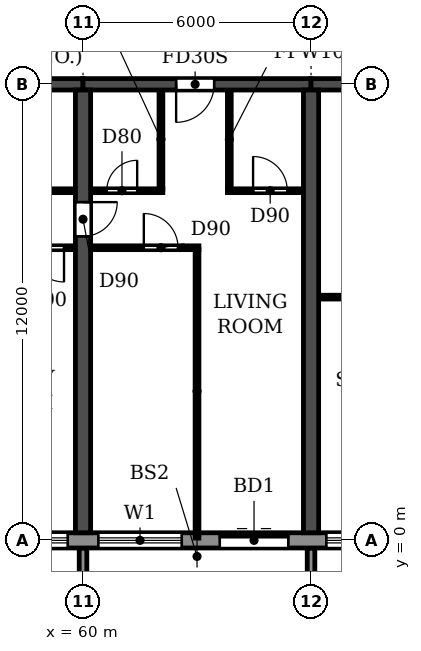
"""IFC4 building model, lengths in metres.
Left out: names, types, materials, properties, quantities, classifications, styles, units other than length and angle.
Written with IfcOpenShell. Run it as: python <this file> out.ifc"""

import sys

from ifc_helpers import new_model, si_unit, direction, frame, frame_2d, origin, place, context, subcontext, project, spatial, polyline, rectangle, outline, extrude, source, transform, mapped, element, fill, save


model = new_model("IFC4")
c1 = context("Model", 3, precision=1e-05, world=origin(), true_north=direction((0.0, 1.0)))
c2 = subcontext(c1, "Body", "Model", "MODEL_VIEW")
j1 = project(units=[si_unit("LENGTHUNIT", "METRE"), si_unit("PLANEANGLEUNIT", "RADIAN")], contexts=[c1])
p1 = place(None, origin())
s1 = spatial("IfcSite", under=j1, at=p1, CompositionType="ELEMENT")
p2 = place(p1, origin())
s2 = spatial("IfcBuilding", under=s1, at=p2, CompositionType="ELEMENT")
p3 = place(p2, frame((0.0, 0.0, 49.8)))
s3 = spatial("IfcBuildingStorey", under=s2, at=p3, CompositionType="ELEMENT", Elevation=49.8)
p4 = place(p3, frame((60.0, 0.2, 0.0), z_axis=(0.0, 0.0, 1.0), x_axis=(0.0, 1.0, 0.0)))
e1 = element("IfcWall", 1, at=p4, inside=s3, PredefinedType="SHEAR", context=c2, shape_type="SweptSolid", body=[
    extrude(rectangle(XDim=11.65, YDim=0.4, at=frame_2d((5.825, 0.0))), origin(), (0.0, 0.0, 1.0), 3.0),
])
p5 = place(p4, frame((7.8, 0.0, 0.0)))
e2 = element("IfcOpeningElement", 2, at=p5, cuts=e1, PredefinedType="OPENING", context=c2, shape_type="SweptSolid", body=[
    extrude(rectangle(XDim=0.9, YDim=2.1, at=frame_2d((0.45, 1.05))), frame((0.0, 0.21, 0.0), z_axis=(0.0, -1.0, 0.0), x_axis=(1.0, 0.0, 0.0)), (0.0, 0.0, 1.0), 0.42),
])
p6 = place(p3, frame((66.0, 0.2, 0.0), z_axis=(0.0, 0.0, 1.0), x_axis=(0.0, 1.0, 0.0)))
e3 = element("IfcWall", 3, at=p6, inside=s3, PredefinedType="SHEAR", context=c2, shape_type="SweptSolid", body=[
    extrude(rectangle(XDim=11.65, YDim=0.4, at=frame_2d((5.825, 0.0))), origin(), (0.0, 0.0, 1.0), 3.0),
])
p7 = place(p3, frame((54.0, 12.0, 0.0), z_axis=(0.0, 0.0, 1.0), x_axis=(1.0, 0.0, 0.0)))
e4 = element("IfcWall", 4, at=p7, inside=s3, PredefinedType="SHEAR", context=c2, shape_type="SweptSolid", body=[
    extrude(rectangle(XDim=6.0, YDim=0.3, at=frame_2d((3.0, 0.0))), origin(), (0.0, 0.0, 1.0), 2.4),
])
p8 = place(p3, frame((60.0, 12.0, 0.0), z_axis=(0.0, 0.0, 1.0), x_axis=(1.0, 0.0, 0.0)))
e5 = element("IfcWall", 5, at=p8, inside=s3, PredefinedType="SHEAR", context=c2, shape_type="SweptSolid", body=[
    extrude(rectangle(XDim=6.0, YDim=0.3, at=frame_2d((3.0, 0.0))), origin(), (0.0, 0.0, 1.0), 2.4),
])
p9 = place(p8, frame((2.45, 0.0, 0.0)))
e6 = element("IfcOpeningElement", 6, at=p9, cuts=e5, PredefinedType="OPENING", context=c2, shape_type="SweptSolid", body=[
    extrude(rectangle(XDim=1.0, YDim=2.1, at=frame_2d((0.5, 1.05))), frame((0.0, 0.16, 0.0), z_axis=(0.0, -1.0, 0.0), x_axis=(1.0, 0.0, 0.0)), (0.0, 0.0, 1.0), 0.32),
])
p10 = place(p3, frame((66.0, 12.0, 0.0), z_axis=(0.0, 0.0, 1.0), x_axis=(1.0, 0.0, 0.0)))
e7 = element("IfcWall", 7, at=p10, inside=s3, PredefinedType="SHEAR", context=c2, shape_type="SweptSolid", body=[
    extrude(rectangle(XDim=6.0, YDim=0.3, at=frame_2d((3.0, 0.0))), origin(), (0.0, 0.0, 1.0), 2.4),
])
p11 = place(p10, frame((2.55, 0.0, 0.0)))
e8 = element("IfcOpeningElement", 8, at=p11, cuts=e7, PredefinedType="OPENING", context=c2, shape_type="SweptSolid", body=[
    extrude(rectangle(XDim=1.0, YDim=2.1, at=frame_2d((0.5, 1.05))), frame((0.0, 0.16, 0.0), z_axis=(0.0, -1.0, 0.0), x_axis=(1.0, 0.0, 0.0)), (0.0, 0.0, 1.0), 0.32),
])
p12 = place(p3, frame((4.683, 0.0, 0.0), z_axis=(0.0, 0.0, 1.0), x_axis=(1.0, 0.0, 0.0)))
e9 = element("IfcWall", 9, at=p12, inside=s3, PredefinedType="STANDARD", context=c2, shape_type="SweptSolid", body=[
    extrude(rectangle(XDim=92.634, YDim=0.4, at=frame_2d((46.317, 0.0))), origin(), (0.0, 0.0, 1.0), 3.0),
])
p13 = place(p12, frame((1.717, 0.0, 0.9)))
e10 = element("IfcOpeningElement", 10, at=p13, cuts=e9, PredefinedType="OPENING", context=c2, shape_type="SweptSolid", body=[
    extrude(rectangle(XDim=2.2, YDim=1.5, at=frame_2d((1.1, 0.75))), frame((0.0, 0.21, 0.0), z_axis=(0.0, -1.0, 0.0), x_axis=(1.0, 0.0, 0.0)), (0.0, 0.0, 1.0), 0.42),
])
p14 = place(p12, frame((4.717, 0.0, 0.9)))
e11 = element("IfcOpeningElement", 11, at=p14, cuts=e9, PredefinedType="OPENING", context=c2, shape_type="SweptSolid", body=[
    extrude(rectangle(XDim=2.2, YDim=1.5, at=frame_2d((1.1, 0.75))), frame((0.0, 0.21, 0.0), z_axis=(0.0, -1.0, 0.0), x_axis=(1.0, 0.0, 0.0)), (0.0, 0.0, 1.0), 0.42),
])
p15 = place(p12, frame((7.717, 0.0, 0.9)))
e12 = element("IfcOpeningElement", 12, at=p15, cuts=e9, PredefinedType="OPENING", context=c2, shape_type="SweptSolid", body=[
    extrude(rectangle(XDim=2.2, YDim=1.5, at=frame_2d((1.1, 0.75))), frame((0.0, 0.21, 0.0), z_axis=(0.0, -1.0, 0.0), x_axis=(1.0, 0.0, 0.0)), (0.0, 0.0, 1.0), 0.42),
])
p16 = place(p12, frame((10.917, 0.0, 0.0)))
e13 = element("IfcOpeningElement", 13, at=p16, cuts=e9, PredefinedType="OPENING", context=c2, shape_type="SweptSolid", body=[
    extrude(rectangle(XDim=1.8, YDim=2.4, at=frame_2d((0.9, 1.2))), frame((0.0, 0.21, 0.0), z_axis=(0.0, -1.0, 0.0), x_axis=(1.0, 0.0, 0.0)), (0.0, 0.0, 1.0), 0.42),
])
p17 = place(p12, frame((13.717, 0.0, 0.9)))
e14 = element("IfcOpeningElement", 14, at=p17, cuts=e9, PredefinedType="OPENING", context=c2, shape_type="SweptSolid", body=[
    extrude(rectangle(XDim=2.2, YDim=1.5, at=frame_2d((1.1, 0.75))), frame((0.0, 0.21, 0.0), z_axis=(0.0, -1.0, 0.0), x_axis=(1.0, 0.0, 0.0)), (0.0, 0.0, 1.0), 0.42),
])
p18 = place(p12, frame((16.717, 0.0, 0.9)))
e15 = element("IfcOpeningElement", 15, at=p18, cuts=e9, PredefinedType="OPENING", context=c2, shape_type="SweptSolid", body=[
    extrude(rectangle(XDim=2.2, YDim=1.5, at=frame_2d((1.1, 0.75))), frame((0.0, 0.21, 0.0), z_axis=(0.0, -1.0, 0.0), x_axis=(1.0, 0.0, 0.0)), (0.0, 0.0, 1.0), 0.42),
])
p19 = place(p12, frame((19.917, 0.0, 0.0)))
e16 = element("IfcOpeningElement", 16, at=p19, cuts=e9, PredefinedType="OPENING", context=c2, shape_type="SweptSolid", body=[
    extrude(rectangle(XDim=1.8, YDim=2.4, at=frame_2d((0.9, 1.2))), frame((0.0, 0.21, 0.0), z_axis=(0.0, -1.0, 0.0), x_axis=(1.0, 0.0, 0.0)), (0.0, 0.0, 1.0), 0.42),
])
p20 = place(p12, frame((22.717, 0.0, 0.9)))
e17 = element("IfcOpeningElement", 17, at=p20, cuts=e9, PredefinedType="OPENING", context=c2, shape_type="SweptSolid", body=[
    extrude(rectangle(XDim=2.2, YDim=1.5, at=frame_2d((1.1, 0.75))), frame((0.0, 0.21, 0.0), z_axis=(0.0, -1.0, 0.0), x_axis=(1.0, 0.0, 0.0)), (0.0, 0.0, 1.0), 0.42),
])
p21 = place(p12, frame((25.717, 0.0, 0.9)))
e18 = element("IfcOpeningElement", 18, at=p21, cuts=e9, PredefinedType="OPENING", context=c2, shape_type="SweptSolid", body=[
    extrude(rectangle(XDim=2.2, YDim=1.5, at=frame_2d((1.1, 0.75))), frame((0.0, 0.21, 0.0), z_axis=(0.0, -1.0, 0.0), x_axis=(1.0, 0.0, 0.0)), (0.0, 0.0, 1.0), 0.42),
])
p22 = place(p12, frame((28.717, 0.0, 0.9)))
e19 = element("IfcOpeningElement", 19, at=p22, cuts=e9, PredefinedType="OPENING", context=c2, shape_type="SweptSolid", body=[
    extrude(rectangle(XDim=2.2, YDim=1.5, at=frame_2d((1.1, 0.75))), frame((0.0, 0.21, 0.0), z_axis=(0.0, -1.0, 0.0), x_axis=(1.0, 0.0, 0.0)), (0.0, 0.0, 1.0), 0.42),
])
p23 = place(p12, frame((31.717, 0.0, 0.9)))
e20 = element("IfcOpeningElement", 20, at=p23, cuts=e9, PredefinedType="OPENING", context=c2, shape_type="SweptSolid", body=[
    extrude(rectangle(XDim=2.2, YDim=1.5, at=frame_2d((1.1, 0.75))), frame((0.0, 0.21, 0.0), z_axis=(0.0, -1.0, 0.0), x_axis=(1.0, 0.0, 0.0)), (0.0, 0.0, 1.0), 0.42),
])
p24 = place(p12, frame((34.917, 0.0, 0.0)))
e21 = element("IfcOpeningElement", 21, at=p24, cuts=e9, PredefinedType="OPENING", context=c2, shape_type="SweptSolid", body=[
    extrude(rectangle(XDim=1.8, YDim=2.4, at=frame_2d((0.9, 1.2))), frame((0.0, 0.21, 0.0), z_axis=(0.0, -1.0, 0.0), x_axis=(1.0, 0.0, 0.0)), (0.0, 0.0, 1.0), 0.42),
])
p25 = place(p12, frame((37.717, 0.0, 0.9)))
e22 = element("IfcOpeningElement", 22, at=p25, cuts=e9, PredefinedType="OPENING", context=c2, shape_type="SweptSolid", body=[
    extrude(rectangle(XDim=2.2, YDim=1.5, at=frame_2d((1.1, 0.75))), frame((0.0, 0.21, 0.0), z_axis=(0.0, -1.0, 0.0), x_axis=(1.0, 0.0, 0.0)), (0.0, 0.0, 1.0), 0.42),
])
p26 = place(p12, frame((40.717, 0.0, 0.9)))
e23 = element("IfcOpeningElement", 23, at=p26, cuts=e9, PredefinedType="OPENING", context=c2, shape_type="SweptSolid", body=[
    extrude(rectangle(XDim=2.2, YDim=1.5, at=frame_2d((1.1, 0.75))), frame((0.0, 0.21, 0.0), z_axis=(0.0, -1.0, 0.0), x_axis=(1.0, 0.0, 0.0)), (0.0, 0.0, 1.0), 0.42),
])
p27 = place(p12, frame((43.717, 0.0, 0.9)))
e24 = element("IfcOpeningElement", 24, at=p27, cuts=e9, PredefinedType="OPENING", context=c2, shape_type="SweptSolid", body=[
    extrude(rectangle(XDim=2.2, YDim=1.5, at=frame_2d((1.1, 0.75))), frame((0.0, 0.21, 0.0), z_axis=(0.0, -1.0, 0.0), x_axis=(1.0, 0.0, 0.0)), (0.0, 0.0, 1.0), 0.42),
])
p28 = place(p12, frame((46.917, 0.0, 0.0)))
e25 = element("IfcOpeningElement", 25, at=p28, cuts=e9, PredefinedType="OPENING", context=c2, shape_type="SweptSolid", body=[
    extrude(rectangle(XDim=1.8, YDim=2.4, at=frame_2d((0.9, 1.2))), frame((0.0, 0.21, 0.0), z_axis=(0.0, -1.0, 0.0), x_axis=(1.0, 0.0, 0.0)), (0.0, 0.0, 1.0), 0.42),
])
p29 = place(p12, frame((49.717, 0.0, 0.9)))
e26 = element("IfcOpeningElement", 26, at=p29, cuts=e9, PredefinedType="OPENING", context=c2, shape_type="SweptSolid", body=[
    extrude(rectangle(XDim=2.2, YDim=1.5, at=frame_2d((1.1, 0.75))), frame((0.0, 0.21, 0.0), z_axis=(0.0, -1.0, 0.0), x_axis=(1.0, 0.0, 0.0)), (0.0, 0.0, 1.0), 0.42),
])
p30 = place(p12, frame((52.717, 0.0, 0.9)))
e27 = element("IfcOpeningElement", 27, at=p30, cuts=e9, PredefinedType="OPENING", context=c2, shape_type="SweptSolid", body=[
    extrude(rectangle(XDim=2.2, YDim=1.5, at=frame_2d((1.1, 0.75))), frame((0.0, 0.21, 0.0), z_axis=(0.0, -1.0, 0.0), x_axis=(1.0, 0.0, 0.0)), (0.0, 0.0, 1.0), 0.42),
])
p31 = place(p12, frame((55.717, 0.0, 0.9)))
e28 = element("IfcOpeningElement", 28, at=p31, cuts=e9, PredefinedType="OPENING", context=c2, shape_type="SweptSolid", body=[
    extrude(rectangle(XDim=2.2, YDim=1.5, at=frame_2d((1.1, 0.75))), frame((0.0, 0.21, 0.0), z_axis=(0.0, -1.0, 0.0), x_axis=(1.0, 0.0, 0.0)), (0.0, 0.0, 1.0), 0.42),
])
p32 = place(p12, frame((58.917, 0.0, 0.0)))
e29 = element("IfcOpeningElement", 29, at=p32, cuts=e9, PredefinedType="OPENING", context=c2, shape_type="SweptSolid", body=[
    extrude(rectangle(XDim=1.8, YDim=2.4, at=frame_2d((0.9, 1.2))), frame((0.0, 0.21, 0.0), z_axis=(0.0, -1.0, 0.0), x_axis=(1.0, 0.0, 0.0)), (0.0, 0.0, 1.0), 0.42),
])
p33 = place(p12, frame((61.717, 0.0, 0.9)))
e30 = element("IfcOpeningElement", 30, at=p33, cuts=e9, PredefinedType="OPENING", context=c2, shape_type="SweptSolid", body=[
    extrude(rectangle(XDim=2.2, YDim=1.5, at=frame_2d((1.1, 0.75))), frame((0.0, 0.21, 0.0), z_axis=(0.0, -1.0, 0.0), x_axis=(1.0, 0.0, 0.0)), (0.0, 0.0, 1.0), 0.42),
])
p34 = place(p12, frame((64.717, 0.0, 0.9)))
e31 = element("IfcOpeningElement", 31, at=p34, cuts=e9, PredefinedType="OPENING", context=c2, shape_type="SweptSolid", body=[
    extrude(rectangle(XDim=2.2, YDim=1.5, at=frame_2d((1.1, 0.75))), frame((0.0, 0.21, 0.0), z_axis=(0.0, -1.0, 0.0), x_axis=(1.0, 0.0, 0.0)), (0.0, 0.0, 1.0), 0.42),
])
p35 = place(p12, frame((67.717, 0.0, 0.9)))
e32 = element("IfcOpeningElement", 32, at=p35, cuts=e9, PredefinedType="OPENING", context=c2, shape_type="SweptSolid", body=[
    extrude(rectangle(XDim=2.2, YDim=1.5, at=frame_2d((1.1, 0.75))), frame((0.0, 0.21, 0.0), z_axis=(0.0, -1.0, 0.0), x_axis=(1.0, 0.0, 0.0)), (0.0, 0.0, 1.0), 0.42),
])
p36 = place(p12, frame((70.917, 0.0, 0.0)))
e33 = element("IfcOpeningElement", 33, at=p36, cuts=e9, PredefinedType="OPENING", context=c2, shape_type="SweptSolid", body=[
    extrude(rectangle(XDim=1.8, YDim=2.4, at=frame_2d((0.9, 1.2))), frame((0.0, 0.21, 0.0), z_axis=(0.0, -1.0, 0.0), x_axis=(1.0, 0.0, 0.0)), (0.0, 0.0, 1.0), 0.42),
])
p37 = place(p12, frame((73.717, 0.0, 0.9)))
e34 = element("IfcOpeningElement", 34, at=p37, cuts=e9, PredefinedType="OPENING", context=c2, shape_type="SweptSolid", body=[
    extrude(rectangle(XDim=2.2, YDim=1.5, at=frame_2d((1.1, 0.75))), frame((0.0, 0.21, 0.0), z_axis=(0.0, -1.0, 0.0), x_axis=(1.0, 0.0, 0.0)), (0.0, 0.0, 1.0), 0.42),
])
p38 = place(p12, frame((76.717, 0.0, 0.9)))
e35 = element("IfcOpeningElement", 35, at=p38, cuts=e9, PredefinedType="OPENING", context=c2, shape_type="SweptSolid", body=[
    extrude(rectangle(XDim=2.2, YDim=1.5, at=frame_2d((1.1, 0.75))), frame((0.0, 0.21, 0.0), z_axis=(0.0, -1.0, 0.0), x_axis=(1.0, 0.0, 0.0)), (0.0, 0.0, 1.0), 0.42),
])
p39 = place(p12, frame((79.717, 0.0, 0.9)))
e36 = element("IfcOpeningElement", 36, at=p39, cuts=e9, PredefinedType="OPENING", context=c2, shape_type="SweptSolid", body=[
    extrude(rectangle(XDim=2.2, YDim=1.5, at=frame_2d((1.1, 0.75))), frame((0.0, 0.21, 0.0), z_axis=(0.0, -1.0, 0.0), x_axis=(1.0, 0.0, 0.0)), (0.0, 0.0, 1.0), 0.42),
])
p40 = place(p12, frame((82.917, 0.0, 0.0)))
e37 = element("IfcOpeningElement", 37, at=p40, cuts=e9, PredefinedType="OPENING", context=c2, shape_type="SweptSolid", body=[
    extrude(rectangle(XDim=1.8, YDim=2.4, at=frame_2d((0.9, 1.2))), frame((0.0, 0.21, 0.0), z_axis=(0.0, -1.0, 0.0), x_axis=(1.0, 0.0, 0.0)), (0.0, 0.0, 1.0), 0.42),
])
p41 = place(p12, frame((85.717, 0.0, 0.9)))
e38 = element("IfcOpeningElement", 38, at=p41, cuts=e9, PredefinedType="OPENING", context=c2, shape_type="SweptSolid", body=[
    extrude(rectangle(XDim=2.2, YDim=1.5, at=frame_2d((1.1, 0.75))), frame((0.0, 0.21, 0.0), z_axis=(0.0, -1.0, 0.0), x_axis=(1.0, 0.0, 0.0)), (0.0, 0.0, 1.0), 0.42),
])
p42 = place(p12, frame((88.717, 0.0, 0.9)))
e39 = element("IfcOpeningElement", 39, at=p42, cuts=e9, PredefinedType="OPENING", context=c2, shape_type="SweptSolid", body=[
    extrude(rectangle(XDim=2.2, YDim=1.5, at=frame_2d((1.1, 0.75))), frame((0.0, 0.21, 0.0), z_axis=(0.0, -1.0, 0.0), x_axis=(1.0, 0.0, 0.0)), (0.0, 0.0, 1.0), 0.42),
])
m1 = source(origin(), c2, "Body", "SweptSolid", [
    extrude(outline(polyline([(0.0, 0.0), (0.2, 0.0), (0.2, 1.65), (0.0, 1.65), (0.0, 0.0)])), origin(), (0.0, 0.0, 1.0), 3.1),
])
for number, where in (
    (40, (59.9, -1.85, 0.0)),
    (41, (65.9, -1.85, 0.0)),
):
    element("IfcWall", number, at=place(p3, frame(where)), inside=s3, PredefinedType="STANDARD", context=c2, shape_type="MappedRepresentation", body=[
        mapped(m1, transform((0.0, 0.0, 0.0))),
    ])
p43 = place(p3, frame((66.21, 6.4, 0.0), z_axis=(0.0, 0.0, 1.0), x_axis=(1.0, 0.0, 0.0)))
e42 = element("IfcWall", 42, at=p43, inside=s3, PredefinedType="PARTITIONING", context=c2, shape_type="SweptSolid", body=[
    extrude(rectangle(XDim=1.99, YDim=0.1, at=frame_2d((0.995, 0.0))), origin(), (0.0, 0.0, 1.0), 3.0),
])
p44 = place(p3, frame((57.1, 7.7, 0.0), z_axis=(0.0, 0.0, 1.0), x_axis=(1.0, 0.0, 0.0)))
e43 = element("IfcWall", 43, at=p44, inside=s3, PredefinedType="PARTITIONING", context=c2, shape_type="SweptSolid", body=[
    extrude(rectangle(XDim=2.69, YDim=0.1, at=frame_2d((1.345, 0.0))), origin(), (0.0, 0.0, 1.0), 3.0),
])
p45 = place(p44, frame((1.5, 0.0, 0.0)))
e44 = element("IfcOpeningElement", 44, at=p45, cuts=e43, PredefinedType="OPENING", context=c2, shape_type="SweptSolid", body=[
    extrude(rectangle(XDim=0.9, YDim=2.1, at=frame_2d((0.45, 1.05))), frame((0.0, 0.06, 0.0), z_axis=(0.0, -1.0, 0.0), x_axis=(1.0, 0.0, 0.0)), (0.0, 0.0, 1.0), 0.12),
])
p46 = place(p3, frame((60.21, 7.7, 0.0), z_axis=(0.0, 0.0, 1.0), x_axis=(1.0, 0.0, 0.0)))
e45 = element("IfcWall", 45, at=p46, inside=s3, PredefinedType="PARTITIONING", context=c2, shape_type="SweptSolid", body=[
    extrude(rectangle(XDim=2.84, YDim=0.1, at=frame_2d((1.42, 0.0))), origin(), (0.0, 0.0, 1.0), 3.0),
])
p47 = place(p46, frame((1.39, 0.0, 0.0)))
e46 = element("IfcOpeningElement", 46, at=p47, cuts=e45, PredefinedType="OPENING", context=c2, shape_type="SweptSolid", body=[
    extrude(rectangle(XDim=0.9, YDim=2.1, at=frame_2d((0.45, 1.05))), frame((0.0, 0.06, 0.0), z_axis=(0.0, -1.0, 0.0), x_axis=(1.0, 0.0, 0.0)), (0.0, 0.0, 1.0), 0.12),
])
p48 = place(p3, frame((57.1, 9.2, 0.0), z_axis=(0.0, 0.0, 1.0), x_axis=(1.0, 0.0, 0.0)))
e47 = element("IfcWall", 47, at=p48, inside=s3, PredefinedType="PARTITIONING", context=c2, shape_type="SweptSolid", body=[
    extrude(rectangle(XDim=2.69, YDim=0.1, at=frame_2d((1.345, 0.0))), origin(), (0.0, 0.0, 1.0), 3.0),
])
p49 = place(p48, frame((1.0, 0.0, 0.0)))
e48 = element("IfcOpeningElement", 48, at=p49, cuts=e47, PredefinedType="OPENING", context=c2, shape_type="SweptSolid", body=[
    extrude(rectangle(XDim=0.8, YDim=2.1, at=frame_2d((0.4, 1.05))), frame((0.0, 0.06, 0.0), z_axis=(0.0, -1.0, 0.0), x_axis=(1.0, 0.0, 0.0)), (0.0, 0.0, 1.0), 0.12),
])
p50 = place(p3, frame((60.21, 9.2, 0.0), z_axis=(0.0, 0.0, 1.0), x_axis=(1.0, 0.0, 0.0)))
e49 = element("IfcWall", 49, at=p50, inside=s3, PredefinedType="PARTITIONING", context=c2, shape_type="SweptSolid", body=[
    extrude(rectangle(XDim=1.89, YDim=0.1, at=frame_2d((0.945, 0.0))), origin(), (0.0, 0.0, 1.0), 3.0),
])
p51 = place(p50, frame((0.415, 0.0, 0.0)))
e50 = element("IfcOpeningElement", 50, at=p51, cuts=e49, PredefinedType="OPENING", context=c2, shape_type="SweptSolid", body=[
    extrude(rectangle(XDim=0.8, YDim=2.1, at=frame_2d((0.4, 1.05))), frame((0.0, 0.06, 0.0), z_axis=(0.0, -1.0, 0.0), x_axis=(1.0, 0.0, 0.0)), (0.0, 0.0, 1.0), 0.12),
])
p52 = place(p3, frame((63.8, 9.2, 0.0), z_axis=(0.0, 0.0, 1.0), x_axis=(1.0, 0.0, 0.0)))
e51 = element("IfcWall", 51, at=p52, inside=s3, PredefinedType="PARTITIONING", context=c2, shape_type="SweptSolid", body=[
    extrude(rectangle(XDim=1.99, YDim=0.1, at=frame_2d((0.995, 0.0))), origin(), (0.0, 0.0, 1.0), 3.0),
])
p53 = place(p52, frame((0.675, 0.0, 0.0)))
e52 = element("IfcOpeningElement", 52, at=p53, cuts=e51, PredefinedType="OPENING", context=c2, shape_type="SweptSolid", body=[
    extrude(rectangle(XDim=0.9, YDim=2.1, at=frame_2d((0.45, 1.05))), frame((0.0, 0.06, 0.0), z_axis=(0.0, -1.0, 0.0), x_axis=(1.0, 0.0, 0.0)), (0.0, 0.0, 1.0), 0.12),
])
p54 = place(p3, frame((62.05, 9.25, 0.0), z_axis=(0.0, 0.0, 1.0), x_axis=(0.0, 1.0, 0.0)))
e53 = element("IfcWall", 53, at=p54, inside=s3, PredefinedType="PARTITIONING", context=c2, shape_type="SweptSolid", body=[
    extrude(rectangle(XDim=2.59, YDim=0.1, at=frame_2d((1.295, 0.0))), origin(), (0.0, 0.0, 1.0), 3.0),
])
p55 = place(p3, frame((63.0, 0.06, 0.0), z_axis=(0.0, 0.0, 1.0), x_axis=(0.0, 1.0, 0.0)))
e54 = element("IfcWall", 54, at=p55, inside=s3, PredefinedType="PARTITIONING", context=c2, shape_type="SweptSolid", body=[
    extrude(rectangle(XDim=7.59, YDim=0.1, at=frame_2d((3.795, 0.0))), origin(), (0.0, 0.0, 1.0), 3.0),
])
p56 = place(p3, frame((63.85, 9.25, 0.0), z_axis=(0.0, 0.0, 1.0), x_axis=(0.0, 1.0, 0.0)))
e55 = element("IfcWall", 55, at=p56, inside=s3, PredefinedType="PARTITIONING", context=c2, shape_type="SweptSolid", body=[
    extrude(rectangle(XDim=2.59, YDim=0.1, at=frame_2d((1.295, 0.0))), origin(), (0.0, 0.0, 1.0), 3.0),
])
p57 = place(p30, origin())
e56 = element("IfcWindow", 56, at=p57, inside=s3, PartitioningType="DOUBLE_PANEL_HORIZONTAL", PredefinedType="WINDOW", context=c2, shape_type="SweptSolid", body=[
    extrude(rectangle(XDim=2.2, YDim=1.5, at=frame_2d((1.1, 0.75))), frame((0.0, 0.03, 0.0), z_axis=(0.0, -1.0, 0.0), x_axis=(1.0, 0.0, 0.0)), (0.0, 0.0, 1.0), 0.06),
])
fill(e27, e56)
p58 = place(p31, origin())
e57 = element("IfcWindow", 57, at=p58, inside=s3, PartitioningType="DOUBLE_PANEL_HORIZONTAL", PredefinedType="WINDOW", context=c2, shape_type="SweptSolid", body=[
    extrude(rectangle(XDim=2.2, YDim=1.5, at=frame_2d((1.1, 0.75))), frame((0.0, 0.03, 0.0), z_axis=(0.0, -1.0, 0.0), x_axis=(1.0, 0.0, 0.0)), (0.0, 0.0, 1.0), 0.06),
])
fill(e28, e57)
p59 = place(p32, origin())
e58 = element("IfcDoor", 58, at=p59, inside=s3, OperationType="DOUBLE_DOOR_SLIDING", PredefinedType="DOOR", context=c2, shape_type="SweptSolid", body=[
    extrude(rectangle(XDim=1.8, YDim=2.4, at=frame_2d((0.9, 1.2))), frame((0.0, 0.025, 0.0), z_axis=(0.0, -1.0, 0.0), x_axis=(1.0, 0.0, 0.0)), (0.0, 0.0, 1.0), 0.05),
])
fill(e29, e58)
p60 = place(p33, origin())
e59 = element("IfcWindow", 59, at=p60, inside=s3, PartitioningType="DOUBLE_PANEL_HORIZONTAL", PredefinedType="WINDOW", context=c2, shape_type="SweptSolid", body=[
    extrude(rectangle(XDim=2.2, YDim=1.5, at=frame_2d((1.1, 0.75))), frame((0.0, 0.03, 0.0), z_axis=(0.0, -1.0, 0.0), x_axis=(1.0, 0.0, 0.0)), (0.0, 0.0, 1.0), 0.06),
])
fill(e30, e59)
p61 = place(p45, frame((0.9, 0.0, 0.0), z_axis=(0.0, 0.0, 1.0), x_axis=(-1.0, 0.0, 0.0)))
e60 = element("IfcDoor", 60, at=p61, inside=s3, OperationType="SINGLE_SWING_LEFT", PredefinedType="DOOR", context=c2, shape_type="SweptSolid", body=[
    extrude(rectangle(XDim=0.9, YDim=2.1, at=frame_2d((0.45, 1.05))), frame((0.0, 0.025, 0.0), z_axis=(0.0, -1.0, 0.0), x_axis=(1.0, 0.0, 0.0)), (0.0, 0.0, 1.0), 0.05),
])
fill(e44, e60)
p62 = place(p5, frame((0.9, 0.0, 0.0), z_axis=(0.0, 0.0, 1.0), x_axis=(-1.0, 0.0, 0.0)))
e61 = element("IfcDoor", 61, at=p62, inside=s3, OperationType="SINGLE_SWING_LEFT", PredefinedType="DOOR", context=c2, shape_type="SweptSolid", body=[
    extrude(rectangle(XDim=0.9, YDim=2.1, at=frame_2d((0.45, 1.05))), frame((0.0, 0.025, 0.0), z_axis=(0.0, -1.0, 0.0), x_axis=(1.0, 0.0, 0.0)), (0.0, 0.0, 1.0), 0.05),
])
fill(e2, e61)
p63 = place(p51, origin())
e62 = element("IfcDoor", 62, at=p63, inside=s3, OperationType="SINGLE_SWING_RIGHT", PredefinedType="DOOR", context=c2, shape_type="SweptSolid", body=[
    extrude(rectangle(XDim=0.8, YDim=2.1, at=frame_2d((0.4, 1.05))), frame((0.0, 0.025, 0.0), z_axis=(0.0, -1.0, 0.0), x_axis=(1.0, 0.0, 0.0)), (0.0, 0.0, 1.0), 0.05),
])
fill(e50, e62)
p64 = place(p47, origin())
e63 = element("IfcDoor", 63, at=p64, inside=s3, OperationType="SINGLE_SWING_LEFT", PredefinedType="DOOR", context=c2, shape_type="SweptSolid", body=[
    extrude(rectangle(XDim=0.9, YDim=2.1, at=frame_2d((0.45, 1.05))), frame((0.0, 0.025, 0.0), z_axis=(0.0, -1.0, 0.0), x_axis=(1.0, 0.0, 0.0)), (0.0, 0.0, 1.0), 0.05),
])
fill(e46, e63)
p65 = place(p9, frame((1.0, 0.0, 0.0), z_axis=(0.0, 0.0, 1.0), x_axis=(-1.0, 0.0, 0.0)))
e64 = element("IfcDoor", 64, at=p65, inside=s3, OperationType="SINGLE_SWING_RIGHT", PredefinedType="DOOR", context=c2, shape_type="SweptSolid", body=[
    extrude(rectangle(XDim=1.0, YDim=2.1, at=frame_2d((0.5, 1.05))), frame((0.0, 0.025, 0.0), z_axis=(0.0, -1.0, 0.0), x_axis=(1.0, 0.0, 0.0)), (0.0, 0.0, 1.0), 0.05),
])
fill(e6, e64)
p66 = place(p53, origin())
e65 = element("IfcDoor", 65, at=p66, inside=s3, OperationType="SINGLE_SWING_LEFT", PredefinedType="DOOR", context=c2, shape_type="SweptSolid", body=[
    extrude(rectangle(XDim=0.9, YDim=2.1, at=frame_2d((0.45, 1.05))), frame((0.0, 0.025, 0.0), z_axis=(0.0, -1.0, 0.0), x_axis=(1.0, 0.0, 0.0)), (0.0, 0.0, 1.0), 0.05),
])
fill(e52, e65)
save(model, sys.argv[1])
